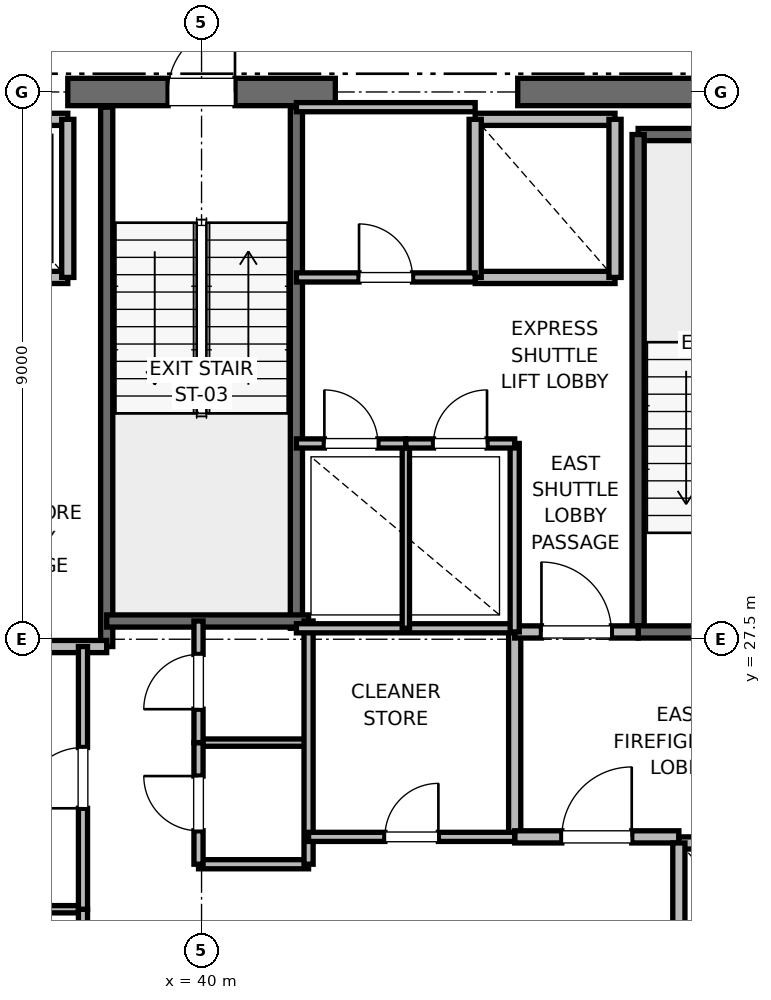
"""IFC4 building model, lengths in metres.
Left out: names, types, materials, properties, quantities, classifications, styles, units other than length and angle.
Written with IfcOpenShell. Run it as: python <this file> out.ifc"""

import sys

from ifc_helpers import new_model, si_unit, direction, frame, frame_2d, origin, place, context, subcontext, project, spatial, rectangle, extrude, element, fill, save


model = new_model("IFC4")
c1 = context("Model", 3, precision=1e-05, world=origin(), true_north=direction((0.0, 1.0)))
c2 = subcontext(c1, "Body", "Model", "MODEL_VIEW")
j1 = project(units=[si_unit("LENGTHUNIT", "METRE"), si_unit("PLANEANGLEUNIT", "RADIAN")], contexts=[c1])
p1 = place(None, origin())
s1 = spatial("IfcSite", under=j1, at=p1, CompositionType="ELEMENT")
p2 = place(p1, origin())
s2 = spatial("IfcBuilding", under=s1, at=p2, CompositionType="ELEMENT")
p3 = place(p2, frame((0.0, 0.0, 267.2)))
s3 = spatial("IfcBuildingStorey", under=s2, at=p3, CompositionType="ELEMENT", Elevation=267.2)
p4 = place(p3, frame((37.8, 36.5, 0.0), z_axis=(0.0, 0.0, 1.0), x_axis=(1.0, 0.0, 0.0)))
e1 = element("IfcWall", 1, at=p4, inside=s3, PredefinedType="SHEAR", context=c2, shape_type="SweptSolid", body=[
    extrude(rectangle(XDim=4.4, YDim=0.45, at=frame_2d((2.2, 0.0))), origin(), (0.0, 0.0, 1.0), 3.785),
])
p5 = place(p4, frame((1.65, 0.0, 0.0)))
e2 = element("IfcOpeningElement", 2, at=p5, cuts=e1, PredefinedType="OPENING", context=c2, shape_type="SweptSolid", body=[
    extrude(rectangle(XDim=1.1, YDim=2.15, at=frame_2d((0.55, 1.075))), frame((0.0, 0.225, 0.0), z_axis=(0.0, -1.0, 0.0), x_axis=(1.0, 0.0, 0.0)), (0.0, 0.0, 1.0), 0.45),
])
p6 = place(p3, frame((45.2, 36.5, 0.0), z_axis=(0.0, 0.0, 1.0), x_axis=(1.0, 0.0, 0.0)))
e3 = element("IfcWall", 3, at=p6, inside=s3, PredefinedType="SHEAR", context=c2, shape_type="SweptSolid", body=[
    extrude(rectangle(XDim=5.8, YDim=0.45, at=frame_2d((2.9, 0.0))), origin(), (0.0, 0.0, 1.0), 3.785),
])
p7 = place(p3, frame((47.18, 35.8, 0.0), z_axis=(0.0, 0.0, 1.0), x_axis=(1.0, 0.0, 0.0)))
e4 = element("IfcWall", 4, at=p7, inside=s3, PredefinedType="SOLIDWALL", context=c2, shape_type="SweptSolid", body=[
    extrude(rectangle(XDim=3.12, YDim=0.2, at=frame_2d((1.56, 0.0))), origin(), (0.0, 0.0, 1.0), 3.785),
])
p8 = place(p3, frame((47.18, 27.62, 0.0), z_axis=(0.0, 0.0, 1.0), x_axis=(0.0, 1.0, 0.0)))
e5 = element("IfcWall", 5, at=p8, inside=s3, PredefinedType="SOLIDWALL", context=c2, shape_type="SweptSolid", body=[
    extrude(rectangle(XDim=8.18, YDim=0.2, at=frame_2d((4.09, 0.0))), origin(), (0.0, 0.0, 1.0), 3.785),
])
p9 = place(p3, frame((47.18, 27.62, 0.0), z_axis=(0.0, 0.0, 1.0), x_axis=(1.0, 0.0, 0.0)))
e6 = element("IfcWall", 6, at=p9, inside=s3, PredefinedType="SOLIDWALL", context=c2, shape_type="SweptSolid", body=[
    extrude(rectangle(XDim=3.12, YDim=0.2, at=frame_2d((1.56, 0.0))), origin(), (0.0, 0.0, 1.0), 3.785),
])
p10 = place(p9, frame((1.01, 0.0, 0.0)))
e7 = element("IfcOpeningElement", 7, at=p10, cuts=e6, PredefinedType="OPENING", context=c2, shape_type="SweptSolid", body=[
    extrude(rectangle(XDim=1.1, YDim=2.15, at=frame_2d((0.55, 1.075))), frame((0.0, 0.1, 0.0), z_axis=(0.0, -1.0, 0.0), x_axis=(1.0, 0.0, 0.0)), (0.0, 0.0, 1.0), 0.2),
])
p11 = place(p3, frame((38.44, 27.38, 0.0), z_axis=(0.0, 0.0, 1.0), x_axis=(0.0, 1.0, 0.0)))
e8 = element("IfcWall", 8, at=p11, inside=s3, PredefinedType="SOLIDWALL", context=c2, shape_type="SweptSolid", body=[
    extrude(rectangle(XDim=8.87, YDim=0.2, at=frame_2d((4.435, 0.0))), origin(), (0.0, 0.0, 1.0), 3.785),
])
p12 = place(p3, frame((41.56, 27.68, 0.0), z_axis=(0.0, 0.0, 1.0), x_axis=(0.0, 1.0, 0.0)))
e9 = element("IfcWall", 9, at=p12, inside=s3, PredefinedType="SOLIDWALL", context=c2, shape_type="SweptSolid", body=[
    extrude(rectangle(XDim=8.57, YDim=0.2, at=frame_2d((4.285, 0.0))), origin(), (0.0, 0.0, 1.0), 3.785),
])
p13 = place(p3, frame((38.44, 27.8, 0.0), z_axis=(0.0, 0.0, 1.0), x_axis=(1.0, 0.0, 0.0)))
e10 = element("IfcWall", 10, at=p13, inside=s3, PredefinedType="SOLIDWALL", context=c2, shape_type="SweptSolid", body=[
    extrude(rectangle(XDim=3.32, YDim=0.2, at=frame_2d((1.66, 0.0))), origin(), (0.0, 0.0, 1.0), 3.785),
])
p14 = place(p3, frame((32.82, 27.38, 0.0), z_axis=(0.0, 0.0, 1.0), x_axis=(1.0, 0.0, 0.0)))
e11 = element("IfcWall", 11, at=p14, inside=s3, PredefinedType="PARTITIONING", context=c2, shape_type="SweptSolid", body=[
    extrude(rectangle(XDim=5.62, YDim=0.2, at=frame_2d((2.81, 0.0))), origin(), (0.0, 0.0, 1.0), 3.785),
])
p15 = place(p3, frame((45.15, 24.25, 0.0), z_axis=(0.0, 0.0, 1.0), x_axis=(0.0, 1.0, 0.0)))
e12 = element("IfcWall", 12, at=p15, inside=s3, PredefinedType="PARTITIONING", context=c2, shape_type="SweptSolid", body=[
    extrude(rectangle(XDim=3.37, YDim=0.2, at=frame_2d((1.685, 0.0))), origin(), (0.0, 0.0, 1.0), 3.785),
])
p16 = place(p3, frame((45.15, 24.25, 0.0), z_axis=(0.0, 0.0, 1.0), x_axis=(1.0, 0.0, 0.0)))
e13 = element("IfcWall", 13, at=p16, inside=s3, PredefinedType="PARTITIONING", context=c2, shape_type="SweptSolid", body=[
    extrude(rectangle(XDim=2.7, YDim=0.2, at=frame_2d((1.35, 0.0))), origin(), (0.0, 0.0, 1.0), 3.785),
])
p17 = place(p16, frame((0.775, 0.0, 0.0)))
e14 = element("IfcOpeningElement", 14, at=p17, cuts=e13, PredefinedType="OPENING", context=c2, shape_type="SweptSolid", body=[
    extrude(rectangle(XDim=1.15, YDim=2.2, at=frame_2d((0.575, 1.1))), frame((0.0, 0.1, 0.0), z_axis=(0.0, -1.0, 0.0), x_axis=(1.0, 0.0, 0.0)), (0.0, 0.0, 1.0), 0.2),
])
p18 = place(p3, frame((45.15, 27.62, 0.0), z_axis=(0.0, 0.0, 1.0), x_axis=(1.0, 0.0, 0.0)))
e15 = element("IfcWall", 15, at=p18, inside=s3, PredefinedType="PARTITIONING", context=c2, shape_type="SweptSolid", body=[
    extrude(rectangle(XDim=2.03, YDim=0.2, at=frame_2d((1.015, 0.0))), origin(), (0.0, 0.0, 1.0), 3.785),
])
p19 = place(p18, frame((0.44, 0.0, 0.0)))
e16 = element("IfcOpeningElement", 16, at=p19, cuts=e15, PredefinedType="OPENING", context=c2, shape_type="SweptSolid", body=[
    extrude(rectangle(XDim=1.15, YDim=2.2, at=frame_2d((0.575, 1.1))), frame((0.0, 0.1, 0.0), z_axis=(0.0, -1.0, 0.0), x_axis=(1.0, 0.0, 0.0)), (0.0, 0.0, 1.0), 0.2),
])
p20 = place(p3, frame((50.45, 24.15, 0.0), z_axis=(0.0, 0.0, 1.0), x_axis=(-1.0, 0.0, 0.0)))
e17 = element("IfcWall", 17, at=p20, inside=s3, PredefinedType="SOLIDWALL", context=c2, shape_type="SweptSolid", body=[
    extrude(rectangle(XDim=2.6, YDim=0.2, at=frame_2d((1.3, 0.0))), origin(), (0.0, 0.0, 1.0), 2.865),
])
p21 = place(p20, frame((0.75, 0.0, 0.0)))
e18 = element("IfcOpeningElement", 18, at=p21, cuts=e17, PredefinedType="OPENING", context=c2, shape_type="SweptSolid", body=[
    extrude(rectangle(XDim=1.1, YDim=2.2, at=frame_2d((0.55, 1.1))), frame((0.0, 0.1, 0.0), z_axis=(0.0, -1.0, 0.0), x_axis=(1.0, 0.0, 0.0)), (0.0, 0.0, 1.0), 0.2),
])
p22 = place(p3, frame((47.85, 24.15, 0.0), z_axis=(0.0, 0.0, 1.0), x_axis=(0.0, -1.0, 0.0)))
e19 = element("IfcWall", 19, at=p22, inside=s3, PredefinedType="SOLIDWALL", context=c2, shape_type="SweptSolid", body=[
    extrude(rectangle(XDim=3.0, YDim=0.2, at=frame_2d((1.5, 0.0))), origin(), (0.0, 0.0, 1.0), 3.785),
])
p23 = place(p3, frame((35.5, 33.45, 0.0), z_axis=(0.0, 0.0, 1.0), x_axis=(1.0, 0.0, 0.0)))
e20 = element("IfcWall", 20, at=p23, inside=s3, PredefinedType="SOLIDWALL", context=c2, shape_type="SweptSolid", body=[
    extrude(rectangle(XDim=2.3, YDim=0.2, at=frame_2d((1.15, 0.0))), origin(), (0.0, 0.0, 1.0), 3.785),
])
p24 = place(p23, frame((0.6, 0.0, 0.0)))
e21 = element("IfcOpeningElement", 21, at=p24, cuts=e20, PredefinedType="OPENING", context=c2, shape_type="SweptSolid", body=[
    extrude(rectangle(XDim=1.1, YDim=2.2, at=frame_2d((0.55, 1.1))), frame((0.0, 0.1, 0.0), z_axis=(0.0, -1.0, 0.0), x_axis=(1.0, 0.0, 0.0)), (0.0, 0.0, 1.0), 0.2),
])
p25 = place(p3, frame((37.8, 36.05, 0.0), z_axis=(0.0, 0.0, 1.0), x_axis=(-1.0, 0.0, 0.0)))
e22 = element("IfcWall", 22, at=p25, inside=s3, PredefinedType="SOLIDWALL", context=c2, shape_type="SweptSolid", body=[
    extrude(rectangle(XDim=2.3, YDim=0.2, at=frame_2d((1.15, 0.0))), origin(), (0.0, 0.0, 1.0), 2.865),
])
p26 = place(p3, frame((37.8, 33.45, 0.0), z_axis=(0.0, 0.0, 1.0), x_axis=(0.0, 1.0, 0.0)))
e23 = element("IfcWall", 23, at=p26, inside=s3, PredefinedType="SOLIDWALL", context=c2, shape_type="SweptSolid", body=[
    extrude(rectangle(XDim=2.6, YDim=0.2, at=frame_2d((1.3, 0.0))), origin(), (0.0, 0.0, 1.0), 2.865),
])
p27 = place(p3, frame((44.5, 33.45, 0.0), z_axis=(0.0, 0.0, 1.0), x_axis=(1.0, 0.0, 0.0)))
e24 = element("IfcWall", 24, at=p27, inside=s3, PredefinedType="SOLIDWALL", context=c2, shape_type="SweptSolid", body=[
    extrude(rectangle(XDim=2.3, YDim=0.2, at=frame_2d((1.15, 0.0))), origin(), (0.0, 0.0, 1.0), 3.785),
])
p28 = place(p3, frame((46.8, 36.05, 0.0), z_axis=(0.0, 0.0, 1.0), x_axis=(-1.0, 0.0, 0.0)))
e25 = element("IfcWall", 25, at=p28, inside=s3, PredefinedType="SOLIDWALL", context=c2, shape_type="SweptSolid", body=[
    extrude(rectangle(XDim=2.3, YDim=0.2, at=frame_2d((1.15, 0.0))), origin(), (0.0, 0.0, 1.0), 2.865),
])
p29 = place(p3, frame((44.5, 36.05, 0.0), z_axis=(0.0, 0.0, 1.0), x_axis=(0.0, -1.0, 0.0)))
e26 = element("IfcWall", 26, at=p29, inside=s3, PredefinedType="SOLIDWALL", context=c2, shape_type="SweptSolid", body=[
    extrude(rectangle(XDim=2.6, YDim=0.2, at=frame_2d((1.3, 0.0))), origin(), (0.0, 0.0, 1.0), 2.865),
])
p30 = place(p3, frame((46.8, 33.45, 0.0), z_axis=(0.0, 0.0, 1.0), x_axis=(0.0, 1.0, 0.0)))
e27 = element("IfcWall", 27, at=p30, inside=s3, PredefinedType="SOLIDWALL", context=c2, shape_type="SweptSolid", body=[
    extrude(rectangle(XDim=2.6, YDim=0.2, at=frame_2d((1.3, 0.0))), origin(), (0.0, 0.0, 1.0), 3.785),
])
p31 = place(p3, frame((39.95, 23.8, 0.0), z_axis=(0.0, 0.0, 1.0), x_axis=(1.0, 0.0, 0.0)))
e28 = element("IfcWall", 28, at=p31, inside=s3, PredefinedType="PARTITIONING", context=c2, shape_type="SweptSolid", body=[
    extrude(rectangle(XDim=1.81, YDim=0.15, at=frame_2d((0.905, 0.0))), origin(), (0.0, 0.0, 1.0), 2.85),
])
p32 = place(p3, frame((39.95, 25.8, 0.0), z_axis=(0.0, 0.0, 1.0), x_axis=(1.0, 0.0, 0.0)))
e29 = element("IfcWall", 29, at=p32, inside=s3, PredefinedType="PARTITIONING", context=c2, shape_type="SweptSolid", body=[
    extrude(rectangle(XDim=1.81, YDim=0.12, at=frame_2d((0.905, 0.0))), origin(), (0.0, 0.0, 1.0), 2.85),
])
p33 = place(p3, frame((41.76, 23.8, 0.0), z_axis=(0.0, 0.0, 1.0), x_axis=(0.0, 1.0, 0.0)))
e30 = element("IfcWall", 30, at=p33, inside=s3, PredefinedType="PARTITIONING", context=c2, shape_type="SweptSolid", body=[
    extrude(rectangle(XDim=4.0, YDim=0.15, at=frame_2d((2.0, 0.0))), origin(), (0.0, 0.0, 1.0), 2.85),
])
p34 = place(p3, frame((39.95, 23.8, 0.0), z_axis=(0.0, 0.0, 1.0), x_axis=(0.0, 1.0, 0.0)))
e31 = element("IfcWall", 31, at=p34, inside=s3, PredefinedType="PARTITIONING", context=c2, shape_type="SweptSolid", body=[
    extrude(rectangle(XDim=2.0, YDim=0.15, at=frame_2d((1.0, 0.0))), origin(), (0.0, 0.0, 1.0), 2.85),
])
p35 = place(p34, frame((0.55, 0.0, 0.0)))
e32 = element("IfcOpeningElement", 32, at=p35, cuts=e31, PredefinedType="OPENING", context=c2, shape_type="SweptSolid", body=[
    extrude(rectangle(XDim=0.9, YDim=2.1, at=frame_2d((0.45, 1.05))), frame((0.0, 0.075, 0.0), z_axis=(0.0, -1.0, 0.0), x_axis=(1.0, 0.0, 0.0)), (0.0, 0.0, 1.0), 0.15),
])
p36 = place(p3, frame((39.95, 25.8, 0.0), z_axis=(0.0, 0.0, 1.0), x_axis=(0.0, 1.0, 0.0)))
e33 = element("IfcWall", 33, at=p36, inside=s3, PredefinedType="PARTITIONING", context=c2, shape_type="SweptSolid", body=[
    extrude(rectangle(XDim=2.0, YDim=0.15, at=frame_2d((1.0, 0.0))), origin(), (0.0, 0.0, 1.0), 2.85),
])
p37 = place(p36, frame((0.55, 0.0, 0.0)))
e34 = element("IfcOpeningElement", 34, at=p37, cuts=e33, PredefinedType="OPENING", context=c2, shape_type="SweptSolid", body=[
    extrude(rectangle(XDim=0.9, YDim=2.1, at=frame_2d((0.45, 1.05))), frame((0.0, 0.075, 0.0), z_axis=(0.0, -1.0, 0.0), x_axis=(1.0, 0.0, 0.0)), (0.0, 0.0, 1.0), 0.15),
])
p38 = place(p3, frame((32.82, 23.06, 0.0), z_axis=(0.0, 0.0, 1.0), x_axis=(1.0, 0.0, 0.0)))
e35 = element("IfcWall", 35, at=p38, inside=s3, PredefinedType="PARTITIONING", context=c2, shape_type="SweptSolid", body=[
    extrude(rectangle(XDim=5.23, YDim=0.12, at=frame_2d((2.615, 0.0))), origin(), (0.0, 0.0, 1.0), 2.85),
])
p39 = place(p3, frame((38.05, 18.6, 0.0), z_axis=(0.0, 0.0, 1.0), x_axis=(0.0, 1.0, 0.0)))
e36 = element("IfcWall", 36, at=p39, inside=s3, PredefinedType="PARTITIONING", context=c2, shape_type="SweptSolid", body=[
    extrude(rectangle(XDim=4.46, YDim=0.15, at=frame_2d((2.23, 0.0))), origin(), (0.0, 0.0, 1.0), 2.85),
])
p40 = place(p39, frame((1.73, 0.0, 0.0)))
e37 = element("IfcOpeningElement", 37, at=p40, cuts=e36, PredefinedType="OPENING", context=c2, shape_type="SweptSolid", body=[
    extrude(rectangle(XDim=1.0, YDim=2.15, at=frame_2d((0.5, 1.075))), frame((0.0, 0.075, 0.0), z_axis=(0.0, -1.0, 0.0), x_axis=(1.0, 0.0, 0.0)), (0.0, 0.0, 1.0), 0.15),
])
p41 = place(p3, frame((38.05, 23.06, 0.0), z_axis=(0.0, 0.0, 1.0), x_axis=(0.0, 1.0, 0.0)))
e38 = element("IfcWall", 38, at=p41, inside=s3, PredefinedType="PARTITIONING", context=c2, shape_type="SweptSolid", body=[
    extrude(rectangle(XDim=4.32, YDim=0.15, at=frame_2d((2.16, 0.0))), origin(), (0.0, 0.0, 1.0), 2.85),
])
p42 = place(p41, frame((1.66, 0.0, 0.0)))
e39 = element("IfcOpeningElement", 39, at=p42, cuts=e38, PredefinedType="OPENING", context=c2, shape_type="SweptSolid", body=[
    extrude(rectangle(XDim=1.0, YDim=2.15, at=frame_2d((0.5, 1.075))), frame((0.0, 0.075, 0.0), z_axis=(0.0, -1.0, 0.0), x_axis=(1.0, 0.0, 0.0)), (0.0, 0.0, 1.0), 0.15),
])
p43 = place(p3, frame((41.56, 27.68, 0.0), z_axis=(0.0, 0.0, 1.0), x_axis=(1.0, 0.0, 0.0)))
e40 = element("IfcWall", 40, at=p43, inside=s3, PredefinedType="PARTITIONING", context=c2, shape_type="SweptSolid", body=[
    extrude(rectangle(XDim=3.59, YDim=0.15, at=frame_2d((1.795, 0.0))), origin(), (0.0, 0.0, 1.0), 2.85),
])
p44 = place(p3, frame((41.76, 24.25, 0.0), z_axis=(0.0, 0.0, 1.0), x_axis=(1.0, 0.0, 0.0)))
e41 = element("IfcWall", 41, at=p44, inside=s3, PredefinedType="PARTITIONING", context=c2, shape_type="SweptSolid", body=[
    extrude(rectangle(XDim=3.39, YDim=0.15, at=frame_2d((1.695, 0.0))), origin(), (0.0, 0.0, 1.0), 2.85),
])
p45 = place(p44, frame((1.255, 0.0, 0.0)))
e42 = element("IfcOpeningElement", 42, at=p45, cuts=e41, PredefinedType="OPENING", context=c2, shape_type="SweptSolid", body=[
    extrude(rectangle(XDim=0.88, YDim=2.1, at=frame_2d((0.44, 1.05))), frame((0.0, 0.075, 0.0), z_axis=(0.0, -1.0, 0.0), x_axis=(1.0, 0.0, 0.0)), (0.0, 0.0, 1.0), 0.15),
])
p46 = place(p3, frame((45.15, 27.62, 0.0), z_axis=(0.0, 0.0, 1.0), x_axis=(0.0, 1.0, 0.0)))
e43 = element("IfcWall", 43, at=p46, inside=s3, PredefinedType="PARTITIONING", context=c2, shape_type="SweptSolid", body=[
    extrude(rectangle(XDim=3.1, YDim=0.15, at=frame_2d((1.55, 0.0))), origin(), (0.0, 0.0, 1.0), 2.85),
])
p47 = place(p3, frame((43.36, 27.68, 0.0), z_axis=(0.0, 0.0, 1.0), x_axis=(0.0, 1.0, 0.0)))
e44 = element("IfcWall", 44, at=p47, inside=s3, PredefinedType="PARTITIONING", context=c2, shape_type="SweptSolid", body=[
    extrude(rectangle(XDim=3.04, YDim=0.12, at=frame_2d((1.52, 0.0))), origin(), (0.0, 0.0, 1.0), 2.85),
])
p48 = place(p3, frame((41.56, 30.72, 0.0), z_axis=(0.0, 0.0, 1.0), x_axis=(1.0, 0.0, 0.0)))
e45 = element("IfcWall", 45, at=p48, inside=s3, PredefinedType="PARTITIONING", context=c2, shape_type="SweptSolid", body=[
    extrude(rectangle(XDim=1.8, YDim=0.15, at=frame_2d((0.9, 0.0))), origin(), (0.0, 0.0, 1.0), 2.85),
])
p49 = place(p48, frame((0.46, 0.0, 0.0)))
e46 = element("IfcOpeningElement", 46, at=p49, cuts=e45, PredefinedType="OPENING", context=c2, shape_type="SweptSolid", body=[
    extrude(rectangle(XDim=0.88, YDim=2.1, at=frame_2d((0.44, 1.05))), frame((0.0, 0.075, 0.0), z_axis=(0.0, -1.0, 0.0), x_axis=(1.0, 0.0, 0.0)), (0.0, 0.0, 1.0), 0.15),
])
p50 = place(p3, frame((43.36, 30.72, 0.0), z_axis=(0.0, 0.0, 1.0), x_axis=(1.0, 0.0, 0.0)))
e47 = element("IfcWall", 47, at=p50, inside=s3, PredefinedType="PARTITIONING", context=c2, shape_type="SweptSolid", body=[
    extrude(rectangle(XDim=1.79, YDim=0.15, at=frame_2d((0.895, 0.0))), origin(), (0.0, 0.0, 1.0), 2.85),
])
p51 = place(p50, frame((0.455, 0.0, 0.0)))
e48 = element("IfcOpeningElement", 48, at=p51, cuts=e47, PredefinedType="OPENING", context=c2, shape_type="SweptSolid", body=[
    extrude(rectangle(XDim=0.88, YDim=2.1, at=frame_2d((0.44, 1.05))), frame((0.0, 0.075, 0.0), z_axis=(0.0, -1.0, 0.0), x_axis=(1.0, 0.0, 0.0)), (0.0, 0.0, 1.0), 0.15),
])
p52 = place(p3, frame((41.56, 36.25, 0.0), z_axis=(0.0, 0.0, 1.0), x_axis=(1.0, 0.0, 0.0)))
e49 = element("IfcWall", 49, at=p52, inside=s3, PredefinedType="PARTITIONING", context=c2, shape_type="SweptSolid", body=[
    extrude(rectangle(XDim=2.94, YDim=0.15, at=frame_2d((1.47, 0.0))), origin(), (0.0, 0.0, 1.0), 2.85),
])
p53 = place(p3, frame((41.56, 33.45, 0.0), z_axis=(0.0, 0.0, 1.0), x_axis=(1.0, 0.0, 0.0)))
e50 = element("IfcWall", 50, at=p53, inside=s3, PredefinedType="PARTITIONING", context=c2, shape_type="SweptSolid", body=[
    extrude(rectangle(XDim=2.94, YDim=0.15, at=frame_2d((1.47, 0.0))), origin(), (0.0, 0.0, 1.0), 2.85),
])
p54 = place(p53, frame((1.03, 0.0, 0.0)))
e51 = element("IfcOpeningElement", 51, at=p54, cuts=e50, PredefinedType="OPENING", context=c2, shape_type="SweptSolid", body=[
    extrude(rectangle(XDim=0.88, YDim=2.1, at=frame_2d((0.44, 1.05))), frame((0.0, 0.075, 0.0), z_axis=(0.0, -1.0, 0.0), x_axis=(1.0, 0.0, 0.0)), (0.0, 0.0, 1.0), 0.15),
])
p55 = place(p5, origin())
e52 = element("IfcDoor", 52, at=p55, inside=s3, OperationType="SINGLE_SWING_RIGHT", PredefinedType="DOOR", context=c2, shape_type="SweptSolid", body=[
    extrude(rectangle(XDim=1.1, YDim=2.15, at=frame_2d((0.55, 1.075))), frame((0.0, 0.025, 0.0), z_axis=(0.0, -1.0, 0.0), x_axis=(1.0, 0.0, 0.0)), (0.0, 0.0, 1.0), 0.05),
])
fill(e2, e52)
p56 = place(p17, origin())
e53 = element("IfcDoor", 53, at=p56, inside=s3, OperationType="SINGLE_SWING_RIGHT", PredefinedType="DOOR", context=c2, shape_type="SweptSolid", body=[
    extrude(rectangle(XDim=1.15, YDim=2.2, at=frame_2d((0.575, 1.1))), frame((0.0, 0.025, 0.0), z_axis=(0.0, -1.0, 0.0), x_axis=(1.0, 0.0, 0.0)), (0.0, 0.0, 1.0), 0.05),
])
fill(e14, e53)
p57 = place(p19, origin())
e54 = element("IfcDoor", 54, at=p57, inside=s3, OperationType="SINGLE_SWING_LEFT", PredefinedType="DOOR", context=c2, shape_type="SweptSolid", body=[
    extrude(rectangle(XDim=1.15, YDim=2.2, at=frame_2d((0.575, 1.1))), frame((0.0, 0.025, 0.0), z_axis=(0.0, -1.0, 0.0), x_axis=(1.0, 0.0, 0.0)), (0.0, 0.0, 1.0), 0.05),
])
fill(e16, e54)
p58 = place(p35, origin())
e55 = element("IfcDoor", 55, at=p58, inside=s3, OperationType="SINGLE_SWING_RIGHT", PredefinedType="DOOR", context=c2, shape_type="SweptSolid", body=[
    extrude(rectangle(XDim=0.9, YDim=2.1, at=frame_2d((0.45, 1.05))), frame((0.0, 0.025, 0.0), z_axis=(0.0, -1.0, 0.0), x_axis=(1.0, 0.0, 0.0)), (0.0, 0.0, 1.0), 0.05),
])
fill(e32, e55)
p59 = place(p37, origin())
e56 = element("IfcDoor", 56, at=p59, inside=s3, OperationType="SINGLE_SWING_LEFT", PredefinedType="DOOR", context=c2, shape_type="SweptSolid", body=[
    extrude(rectangle(XDim=0.9, YDim=2.1, at=frame_2d((0.45, 1.05))), frame((0.0, 0.025, 0.0), z_axis=(0.0, -1.0, 0.0), x_axis=(1.0, 0.0, 0.0)), (0.0, 0.0, 1.0), 0.05),
])
fill(e34, e56)
p60 = place(p42, origin())
e57 = element("IfcDoor", 57, at=p60, inside=s3, OperationType="SINGLE_SWING_LEFT", PredefinedType="DOOR", context=c2, shape_type="SweptSolid", body=[
    extrude(rectangle(XDim=1.0, YDim=2.15, at=frame_2d((0.5, 1.075))), frame((0.0, 0.025, 0.0), z_axis=(0.0, -1.0, 0.0), x_axis=(1.0, 0.0, 0.0)), (0.0, 0.0, 1.0), 0.05),
])
fill(e39, e57)
p61 = place(p45, origin())
e58 = element("IfcDoor", 58, at=p61, inside=s3, OperationType="SINGLE_SWING_RIGHT", PredefinedType="DOOR", context=c2, shape_type="SweptSolid", body=[
    extrude(rectangle(XDim=0.88, YDim=2.1, at=frame_2d((0.44, 1.05))), frame((0.0, 0.025, 0.0), z_axis=(0.0, -1.0, 0.0), x_axis=(1.0, 0.0, 0.0)), (0.0, 0.0, 1.0), 0.05),
])
fill(e42, e58)
p62 = place(p49, origin())
e59 = element("IfcDoor", 59, at=p62, inside=s3, OperationType="SINGLE_SWING_LEFT", PredefinedType="DOOR", context=c2, shape_type="SweptSolid", body=[
    extrude(rectangle(XDim=0.88, YDim=2.1, at=frame_2d((0.44, 1.05))), frame((0.0, 0.025, 0.0), z_axis=(0.0, -1.0, 0.0), x_axis=(1.0, 0.0, 0.0)), (0.0, 0.0, 1.0), 0.05),
])
fill(e46, e59)
p63 = place(p51, origin())
e60 = element("IfcDoor", 60, at=p63, inside=s3, OperationType="SINGLE_SWING_RIGHT", PredefinedType="DOOR", context=c2, shape_type="SweptSolid", body=[
    extrude(rectangle(XDim=0.88, YDim=2.1, at=frame_2d((0.44, 1.05))), frame((0.0, 0.025, 0.0), z_axis=(0.0, -1.0, 0.0), x_axis=(1.0, 0.0, 0.0)), (0.0, 0.0, 1.0), 0.05),
])
fill(e48, e60)
p64 = place(p54, origin())
e61 = element("IfcDoor", 61, at=p64, inside=s3, OperationType="SINGLE_SWING_LEFT", PredefinedType="DOOR", context=c2, shape_type="SweptSolid", body=[
    extrude(rectangle(XDim=0.88, YDim=2.1, at=frame_2d((0.44, 1.05))), frame((0.0, 0.025, 0.0), z_axis=(0.0, -1.0, 0.0), x_axis=(1.0, 0.0, 0.0)), (0.0, 0.0, 1.0), 0.05),
])
fill(e51, e61)
save(model, sys.argv[1])
